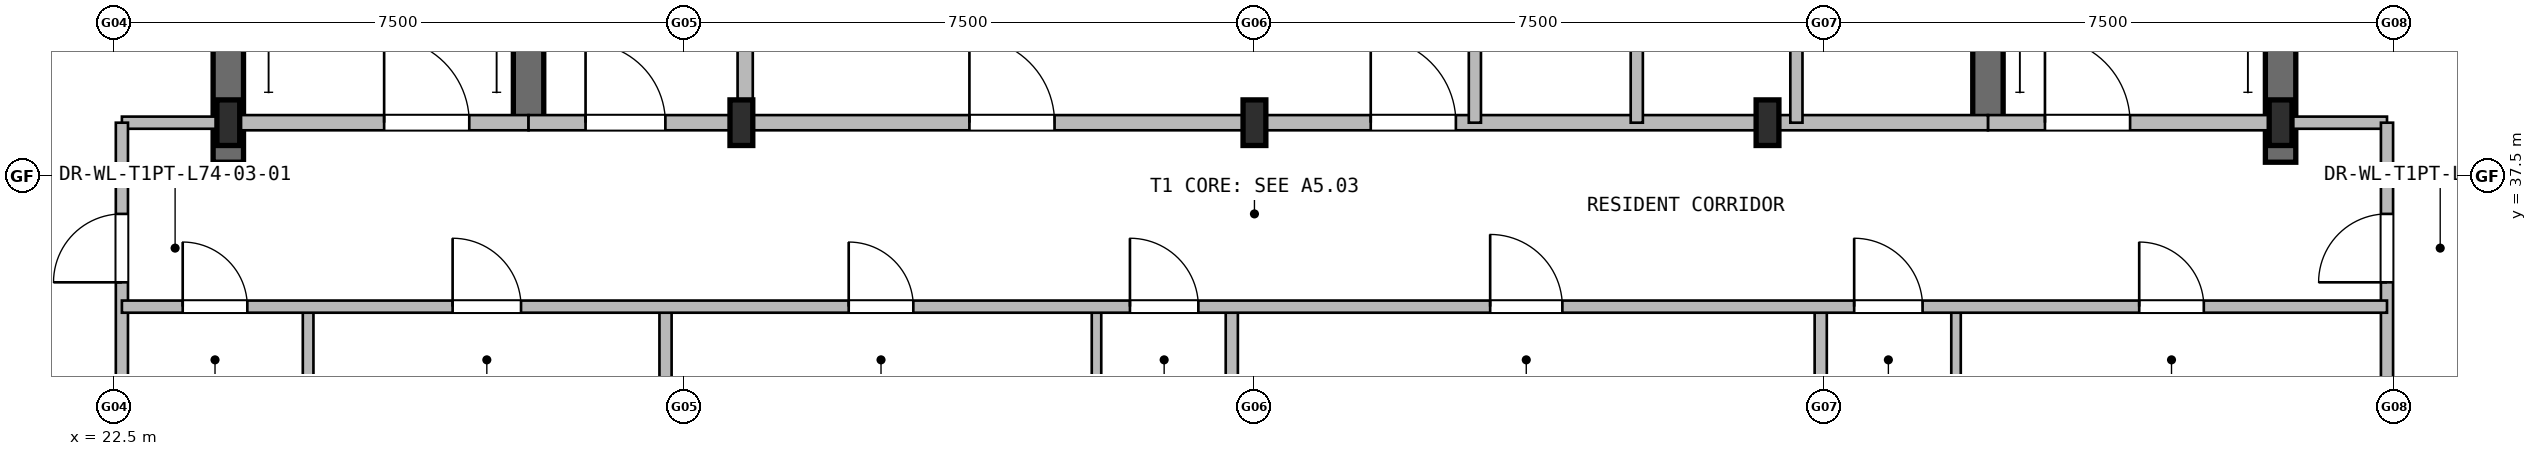
"""IFC4 building model, lengths in metres.
Left out: names, types, materials, properties, quantities, classifications, styles, units other than length and angle.
Written with IfcOpenShell. Run it as: python <this file> out.ifc"""

import sys

from ifc_helpers import new_model, si_unit, direction, frame, frame_2d, origin, origin_2d, place, context, subcontext, project, spatial, rectangle, i_section, extrude, element, fill, save


model = new_model("IFC4")
c1 = context("Model", 3, precision=1e-05, world=origin(), true_north=direction((0.0, 1.0)))
c2 = subcontext(c1, "Body", "Model", "MODEL_VIEW")
j1 = project(units=[si_unit("LENGTHUNIT", "METRE"), si_unit("PLANEANGLEUNIT", "RADIAN")], contexts=[c1])
p1 = place(None, origin())
s1 = spatial("IfcSite", under=j1, at=p1, CompositionType="ELEMENT")
p2 = place(p1, origin())
s2 = spatial("IfcBuilding", under=s1, at=p2, CompositionType="ELEMENT")
p3 = place(p2, frame((0.0, 0.0, 265.8)))
s3 = spatial("IfcBuildingStorey", under=s2, at=p3, CompositionType="ELEMENT", Elevation=265.8)
for number, where, z_axis, x_axis in (
    (1, (24.0, 37.68, 0.0), (0.0, 0.0, 1.0), (0.0, 1.0, 0.0)),
    (2, (51.0, 37.68, 0.0), (0.0, 0.0, 1.0), (0.0, 1.0, 0.0)),
):
    element("IfcWall", number, at=place(p3, frame(where, z_axis=z_axis, x_axis=x_axis)), inside=s3, PredefinedType="SHEAR", context=c2, shape_type="SweptSolid", body=[
        extrude(rectangle(XDim=10.32, YDim=0.4, at=frame_2d((5.16, 0.0))), origin(), (0.0, 0.0, 1.0), 4.2),
    ])
for number, where, z_axis, x_axis in (
    (3, (27.95, 38.2, 0.0), (0.0, 0.0, 1.0), (0.0, 1.0, 0.0)),
    (4, (47.15, 38.2, 0.0), (0.0, 0.0, 1.0), (0.0, 1.0, 0.0)),
):
    element("IfcWall", number, at=place(p3, frame(where, z_axis=z_axis, x_axis=x_axis)), inside=s3, PredefinedType="SHEAR", context=c2, shape_type="SweptSolid", body=[
        extrude(rectangle(XDim=9.8, YDim=0.4, at=frame_2d((4.9, 0.0))), origin(), (0.0, 0.0, 1.0), 4.2),
    ])
for number, where, z_axis, x_axis in (
    (5, (24.0, 38.2, 0.0), (0.0, 0.0, 1.0), (1.0, 0.0, 0.0)),
    (6, (30.75, 38.2, 0.0), (0.0, 0.0, 1.0), (1.0, 0.0, 0.0)),
    (7, (37.5, 38.2, 0.0), (0.0, 0.0, 1.0), (1.0, 0.0, 0.0)),
    (8, (44.25, 38.2, 0.0), (0.0, 0.0, 1.0), (1.0, 0.0, 0.0)),
    (9, (51.0, 38.2, 0.0), (0.0, 0.0, 1.0), (1.0, 0.0, 0.0)),
):
    element("IfcColumn", number, at=place(p3, frame(where, z_axis=z_axis, x_axis=x_axis)), inside=s3, PredefinedType="COLUMN", context=c2, shape_type="SweptSolid", body=[
        extrude(i_section(OverallWidth=0.3, OverallDepth=0.6, WebThickness=0.014, FlangeThickness=0.025, at=origin_2d()), origin(), (0.0, 0.0, 1.0), 4.2),
    ])
p4 = place(p3, frame((24.0, 38.2, 0.0), z_axis=(0.0, 0.0, 1.0), x_axis=(1.0, 0.0, 0.0)))
e10 = element("IfcWall", 10, at=p4, inside=s3, PredefinedType="PARTITIONING", context=c2, shape_type="SweptSolid", body=[
    extrude(rectangle(XDim=3.95, YDim=0.2, at=frame_2d((1.975, 0.0))), origin(), (0.0, 0.0, 1.0), 3.33),
])
p5 = place(p4, frame((2.05, 0.0, 0.0)))
e11 = element("IfcOpeningElement", 11, at=p5, cuts=e10, PredefinedType="OPENING", context=c2, shape_type="SweptSolid", body=[
    extrude(rectangle(XDim=1.12, YDim=2.1, at=frame_2d((0.56, 1.05))), frame((0.0, 0.11, 0.0), z_axis=(0.0, -1.0, 0.0), x_axis=(1.0, 0.0, 0.0)), (0.0, 0.0, 1.0), 0.22),
])
p6 = place(p3, frame((47.15, 38.2, 0.0), z_axis=(0.0, 0.0, 1.0), x_axis=(1.0, 0.0, 0.0)))
e12 = element("IfcWall", 12, at=p6, inside=s3, PredefinedType="PARTITIONING", context=c2, shape_type="SweptSolid", body=[
    extrude(rectangle(XDim=3.85, YDim=0.2, at=frame_2d((1.925, 0.0))), origin(), (0.0, 0.0, 1.0), 3.33),
])
p7 = place(p6, frame((0.75, 0.0, 0.0)))
e13 = element("IfcOpeningElement", 13, at=p7, cuts=e12, PredefinedType="OPENING", context=c2, shape_type="SweptSolid", body=[
    extrude(rectangle(XDim=1.12, YDim=2.1, at=frame_2d((0.56, 1.05))), frame((0.0, 0.11, 0.0), z_axis=(0.0, -1.0, 0.0), x_axis=(1.0, 0.0, 0.0)), (0.0, 0.0, 1.0), 0.22),
])
p8 = place(p3, frame((30.8, 38.2, 0.0), z_axis=(0.0, 0.0, 1.0), x_axis=(0.0, 1.0, 0.0)))
e14 = element("IfcWall", 14, at=p8, inside=s3, PredefinedType="PARTITIONING", context=c2, shape_type="SweptSolid", body=[
    extrude(rectangle(XDim=6.45, YDim=0.2, at=frame_2d((3.225, 0.0))), origin(), (0.0, 0.0, 1.0), 3.33),
])
p9 = place(p8, frame((3.59, 0.0, 0.0)))
e15 = element("IfcOpeningElement", 15, at=p9, cuts=e14, PredefinedType="OPENING", context=c2, shape_type="SweptSolid", body=[
    extrude(rectangle(XDim=1.05, YDim=2.1, at=frame_2d((0.525, 1.05))), frame((0.0, 0.11, 0.0), z_axis=(0.0, -1.0, 0.0), x_axis=(1.0, 0.0, 0.0)), (0.0, 0.0, 1.0), 0.22),
])
p10 = place(p3, frame((27.95, 38.2, 0.0), z_axis=(0.0, 0.0, 1.0), x_axis=(1.0, 0.0, 0.0)))
e16 = element("IfcWall", 16, at=p10, inside=s3, PredefinedType="PARTITIONING", context=c2, shape_type="SweptSolid", body=[
    extrude(rectangle(XDim=2.85, YDim=0.2, at=frame_2d((1.425, 0.0))), origin(), (0.0, 0.0, 1.0), 3.33),
])
p11 = place(p10, frame((0.75, 0.0, 0.0)))
e17 = element("IfcOpeningElement", 17, at=p11, cuts=e16, PredefinedType="OPENING", context=c2, shape_type="SweptSolid", body=[
    extrude(rectangle(XDim=1.05, YDim=2.1, at=frame_2d((0.525, 1.05))), frame((0.0, 0.11, 0.0), z_axis=(0.0, -1.0, 0.0), x_axis=(1.0, 0.0, 0.0)), (0.0, 0.0, 1.0), 0.22),
])
p12 = place(p3, frame((30.8, 38.2, 0.0), z_axis=(0.0, 0.0, 1.0), x_axis=(1.0, 0.0, 0.0)))
e18 = element("IfcWall", 18, at=p12, inside=s3, PredefinedType="PARTITIONING", context=c2, shape_type="SweptSolid", body=[
    extrude(rectangle(XDim=16.35, YDim=0.2, at=frame_2d((8.175, 0.0))), origin(), (0.0, 0.0, 1.0), 3.33),
])
p13 = place(p12, frame((2.95, 0.0, 0.0)))
e19 = element("IfcOpeningElement", 19, at=p13, cuts=e18, PredefinedType="OPENING", context=c2, shape_type="SweptSolid", body=[
    extrude(rectangle(XDim=1.12, YDim=2.1, at=frame_2d((0.56, 1.05))), frame((0.0, 0.11, 0.0), z_axis=(0.0, -1.0, 0.0), x_axis=(1.0, 0.0, 0.0)), (0.0, 0.0, 1.0), 0.22),
])
p14 = place(p12, frame((8.23, 0.0, 0.0)))
e20 = element("IfcOpeningElement", 20, at=p14, cuts=e18, PredefinedType="OPENING", context=c2, shape_type="SweptSolid", body=[
    extrude(rectangle(XDim=1.12, YDim=2.1, at=frame_2d((0.56, 1.05))), frame((0.0, 0.11, 0.0), z_axis=(0.0, -1.0, 0.0), x_axis=(1.0, 0.0, 0.0)), (0.0, 0.0, 1.0), 0.22),
])
for number, where, z_axis, x_axis in (
    (21, (40.4, 38.2, 0.0), (0.0, 0.0, 1.0), (0.0, 1.0, 0.0)),
    (22, (42.53, 38.2, 0.0), (0.0, 0.0, 1.0), (0.0, 1.0, 0.0)),
    (23, (44.63, 38.2, 0.0), (0.0, 0.0, 1.0), (0.0, 1.0, 0.0)),
):
    element("IfcWall", number, at=place(p3, frame(where, z_axis=z_axis, x_axis=x_axis)), inside=s3, PredefinedType="PARTITIONING", context=c2, shape_type="SweptSolid", body=[
        extrude(rectangle(XDim=3.05, YDim=0.16, at=frame_2d((1.525, 0.0))), origin(), (0.0, 0.0, 1.0), 3.93),
    ])
for number, where, z_axis, x_axis in (
    (24, (22.6, 38.2, 0.0), (0.0, 0.0, 1.0), (1.0, 0.0, 0.0)),
    (25, (51.0, 38.2, 0.0), (0.0, 0.0, 1.0), (1.0, 0.0, 0.0)),
):
    element("IfcWall", number, at=place(p3, frame(where, z_axis=z_axis, x_axis=x_axis)), inside=s3, PredefinedType="PARTITIONING", context=c2, shape_type="SweptSolid", body=[
        extrude(rectangle(XDim=1.4, YDim=0.16, at=frame_2d((0.7, 0.0))), origin(), (0.0, 0.0, 1.0), 3.33),
    ])
p15 = place(p3, frame((22.6, 23.6, 0.0), z_axis=(0.0, 0.0, 1.0), x_axis=(0.0, 1.0, 0.0)))
e26 = element("IfcWall", 26, at=p15, inside=s3, PredefinedType="PARTITIONING", context=c2, shape_type="SweptSolid", body=[
    extrude(rectangle(XDim=14.6, YDim=0.16, at=frame_2d((7.3, 0.0))), origin(), (0.0, 0.0, 1.0), 3.93),
])
p16 = place(p15, frame((12.5, 0.0, 0.0)))
e27 = element("IfcOpeningElement", 27, at=p16, cuts=e26, PredefinedType="OPENING", context=c2, shape_type="SweptSolid", body=[
    extrude(rectangle(XDim=0.9, YDim=2.05, at=frame_2d((0.45, 1.025))), frame((0.0, 0.09, 0.0), z_axis=(0.0, -1.0, 0.0), x_axis=(1.0, 0.0, 0.0)), (0.0, 0.0, 1.0), 0.18),
])
p17 = place(p3, frame((52.4, 23.6, 0.0), z_axis=(0.0, 0.0, 1.0), x_axis=(0.0, 1.0, 0.0)))
e28 = element("IfcWall", 28, at=p17, inside=s3, PredefinedType="PARTITIONING", context=c2, shape_type="SweptSolid", body=[
    extrude(rectangle(XDim=14.6, YDim=0.16, at=frame_2d((7.3, 0.0))), origin(), (0.0, 0.0, 1.0), 3.93),
])
p18 = place(p17, frame((12.5, 0.0, 0.0)))
e29 = element("IfcOpeningElement", 29, at=p18, cuts=e28, PredefinedType="OPENING", context=c2, shape_type="SweptSolid", body=[
    extrude(rectangle(XDim=0.9, YDim=2.05, at=frame_2d((0.45, 1.025))), frame((0.0, 0.09, 0.0), z_axis=(0.0, -1.0, 0.0), x_axis=(1.0, 0.0, 0.0)), (0.0, 0.0, 1.0), 0.18),
])
p19 = place(p3, frame((25.05, 32.88, 0.0), z_axis=(0.0, 0.0, 1.0), x_axis=(0.0, 1.0, 0.0)))
e30 = element("IfcWall", 30, at=p19, inside=s3, PredefinedType="PARTITIONING", context=c2, shape_type="SweptSolid", body=[
    extrude(rectangle(XDim=2.9, YDim=0.14, at=frame_2d((1.45, 0.0))), origin(), (0.0, 0.0, 1.0), 3.93),
])
p20 = place(p3, frame((29.752, 23.6, 0.0), z_axis=(0.0, 0.0, 1.0), x_axis=(0.0, 1.0, 0.0)))
e31 = element("IfcWall", 31, at=p20, inside=s3, PredefinedType="PARTITIONING", context=c2, shape_type="SweptSolid", body=[
    extrude(rectangle(XDim=12.18, YDim=0.16, at=frame_2d((6.09, 0.0))), origin(), (0.0, 0.0, 1.0), 3.93),
])
p21 = place(p3, frame((35.422, 32.73, 0.0), z_axis=(0.0, 0.0, 1.0), x_axis=(0.0, 1.0, 0.0)))
e32 = element("IfcWall", 32, at=p21, inside=s3, PredefinedType="PARTITIONING", context=c2, shape_type="SweptSolid", body=[
    extrude(rectangle(XDim=3.05, YDim=0.125, at=frame_2d((1.525, 0.0))), origin(), (0.0, 0.0, 1.0), 3.93),
])
for number, where, z_axis, x_axis in (
    (33, (37.202, 23.6, 0.0), (0.0, 0.0, 1.0), (0.0, 1.0, 0.0)),
    (34, (44.95, 23.6, 0.0), (0.0, 0.0, 1.0), (0.0, 1.0, 0.0)),
):
    element("IfcWall", number, at=place(p3, frame(where, z_axis=z_axis, x_axis=x_axis)), inside=s3, PredefinedType="PARTITIONING", context=c2, shape_type="SweptSolid", body=[
        extrude(rectangle(XDim=12.18, YDim=0.16, at=frame_2d((6.09, 0.0))), origin(), (0.0, 0.0, 1.0), 3.93),
    ])
p22 = place(p3, frame((46.73, 32.73, 0.0), z_axis=(0.0, 0.0, 1.0), x_axis=(0.0, 1.0, 0.0)))
e35 = element("IfcWall", 35, at=p22, inside=s3, PredefinedType="PARTITIONING", context=c2, shape_type="SweptSolid", body=[
    extrude(rectangle(XDim=3.05, YDim=0.125, at=frame_2d((1.525, 0.0))), origin(), (0.0, 0.0, 1.0), 3.93),
])
p23 = place(p3, frame((22.6, 35.78, 0.0), z_axis=(0.0, 0.0, 1.0), x_axis=(1.0, 0.0, 0.0)))
e36 = element("IfcWall", 36, at=p23, inside=s3, PredefinedType="PARTITIONING", context=c2, shape_type="SweptSolid", body=[
    extrude(rectangle(XDim=29.8, YDim=0.16, at=frame_2d((14.9, 0.0))), origin(), (0.0, 0.0, 1.0), 3.93),
])
p24 = place(p23, frame((0.8, 0.0, 0.0)))
e37 = element("IfcOpeningElement", 37, at=p24, cuts=e36, PredefinedType="OPENING", context=c2, shape_type="SweptSolid", body=[
    extrude(rectangle(XDim=0.85, YDim=2.05, at=frame_2d((0.425, 1.025))), frame((0.0, 0.09, 0.0), z_axis=(0.0, -1.0, 0.0), x_axis=(1.0, 0.0, 0.0)), (0.0, 0.0, 1.0), 0.18),
])
p25 = place(p23, frame((4.351, 0.0, 0.0)))
e38 = element("IfcOpeningElement", 38, at=p25, cuts=e36, PredefinedType="OPENING", context=c2, shape_type="SweptSolid", body=[
    extrude(rectangle(XDim=0.9, YDim=2.05, at=frame_2d((0.45, 1.025))), frame((0.0, 0.09, 0.0), z_axis=(0.0, -1.0, 0.0), x_axis=(1.0, 0.0, 0.0)), (0.0, 0.0, 1.0), 0.18),
])
p26 = place(p23, frame((9.562, 0.0, 0.0)))
e39 = element("IfcOpeningElement", 39, at=p26, cuts=e36, PredefinedType="OPENING", context=c2, shape_type="SweptSolid", body=[
    extrude(rectangle(XDim=0.85, YDim=2.05, at=frame_2d((0.425, 1.025))), frame((0.0, 0.09, 0.0), z_axis=(0.0, -1.0, 0.0), x_axis=(1.0, 0.0, 0.0)), (0.0, 0.0, 1.0), 0.18),
])
p27 = place(p23, frame((13.262, 0.0, 0.0)))
e40 = element("IfcOpeningElement", 40, at=p27, cuts=e36, PredefinedType="OPENING", context=c2, shape_type="SweptSolid", body=[
    extrude(rectangle(XDim=0.9, YDim=2.05, at=frame_2d((0.45, 1.025))), frame((0.0, 0.09, 0.0), z_axis=(0.0, -1.0, 0.0), x_axis=(1.0, 0.0, 0.0)), (0.0, 0.0, 1.0), 0.18),
])
p28 = place(p23, frame((18.001, 0.0, 0.0)))
e41 = element("IfcOpeningElement", 41, at=p28, cuts=e36, PredefinedType="OPENING", context=c2, shape_type="SweptSolid", body=[
    extrude(rectangle(XDim=0.95, YDim=2.1, at=frame_2d((0.475, 1.05))), frame((0.0, 0.09, 0.0), z_axis=(0.0, -1.0, 0.0), x_axis=(1.0, 0.0, 0.0)), (0.0, 0.0, 1.0), 0.18),
])
p29 = place(p23, frame((26.54, 0.0, 0.0)))
e42 = element("IfcOpeningElement", 42, at=p29, cuts=e36, PredefinedType="OPENING", context=c2, shape_type="SweptSolid", body=[
    extrude(rectangle(XDim=0.85, YDim=2.05, at=frame_2d((0.425, 1.025))), frame((0.0, 0.09, 0.0), z_axis=(0.0, -1.0, 0.0), x_axis=(1.0, 0.0, 0.0)), (0.0, 0.0, 1.0), 0.18),
])
p30 = place(p23, frame((22.79, 0.0, 0.0)))
e43 = element("IfcOpeningElement", 43, at=p30, cuts=e36, PredefinedType="OPENING", context=c2, shape_type="SweptSolid", body=[
    extrude(rectangle(XDim=0.9, YDim=2.05, at=frame_2d((0.45, 1.025))), frame((0.0, 0.09, 0.0), z_axis=(0.0, -1.0, 0.0), x_axis=(1.0, 0.0, 0.0)), (0.0, 0.0, 1.0), 0.18),
])
p31 = place(p5, origin())
e44 = element("IfcDoor", 44, at=p31, inside=s3, OperationType="SINGLE_SWING_RIGHT", PredefinedType="DOOR", context=c2, shape_type="SweptSolid", body=[
    extrude(rectangle(XDim=1.12, YDim=2.1, at=frame_2d((0.56, 1.05))), frame((0.0, 0.025, 0.0), z_axis=(0.0, -1.0, 0.0), x_axis=(1.0, 0.0, 0.0)), (0.0, 0.0, 1.0), 0.05),
])
fill(e11, e44)
p32 = place(p7, origin())
e45 = element("IfcDoor", 45, at=p32, inside=s3, OperationType="SINGLE_SWING_LEFT", PredefinedType="DOOR", context=c2, shape_type="SweptSolid", body=[
    extrude(rectangle(XDim=1.12, YDim=2.1, at=frame_2d((0.56, 1.05))), frame((0.0, 0.025, 0.0), z_axis=(0.0, -1.0, 0.0), x_axis=(1.0, 0.0, 0.0)), (0.0, 0.0, 1.0), 0.05),
])
fill(e13, e45)
p33 = place(p11, origin())
e46 = element("IfcDoor", 46, at=p33, inside=s3, OperationType="SINGLE_SWING_LEFT", PredefinedType="DOOR", context=c2, shape_type="SweptSolid", body=[
    extrude(rectangle(XDim=1.05, YDim=2.1, at=frame_2d((0.525, 1.05))), frame((0.0, 0.025, 0.0), z_axis=(0.0, -1.0, 0.0), x_axis=(1.0, 0.0, 0.0)), (0.0, 0.0, 1.0), 0.05),
])
fill(e17, e46)
p34 = place(p13, origin())
e47 = element("IfcDoor", 47, at=p34, inside=s3, OperationType="SINGLE_SWING_RIGHT", PredefinedType="DOOR", context=c2, shape_type="SweptSolid", body=[
    extrude(rectangle(XDim=1.12, YDim=2.1, at=frame_2d((0.56, 1.05))), frame((0.0, 0.025, 0.0), z_axis=(0.0, -1.0, 0.0), x_axis=(1.0, 0.0, 0.0)), (0.0, 0.0, 1.0), 0.05),
])
fill(e19, e47)
p35 = place(p14, origin())
e48 = element("IfcDoor", 48, at=p35, inside=s3, OperationType="SINGLE_SWING_LEFT", PredefinedType="DOOR", context=c2, shape_type="SweptSolid", body=[
    extrude(rectangle(XDim=1.12, YDim=2.1, at=frame_2d((0.56, 1.05))), frame((0.0, 0.025, 0.0), z_axis=(0.0, -1.0, 0.0), x_axis=(1.0, 0.0, 0.0)), (0.0, 0.0, 1.0), 0.05),
])
fill(e20, e48)
p36 = place(p16, origin())
e49 = element("IfcDoor", 49, at=p36, inside=s3, OperationType="SINGLE_SWING_RIGHT", PredefinedType="DOOR", context=c2, shape_type="SweptSolid", body=[
    extrude(rectangle(XDim=0.9, YDim=2.05, at=frame_2d((0.45, 1.025))), frame((0.0, 0.025, 0.0), z_axis=(0.0, -1.0, 0.0), x_axis=(1.0, 0.0, 0.0)), (0.0, 0.0, 1.0), 0.05),
])
fill(e27, e49)
p37 = place(p18, origin())
e50 = element("IfcDoor", 50, at=p37, inside=s3, OperationType="SINGLE_SWING_LEFT", PredefinedType="DOOR", context=c2, shape_type="SweptSolid", body=[
    extrude(rectangle(XDim=0.9, YDim=2.05, at=frame_2d((0.45, 1.025))), frame((0.0, 0.025, 0.0), z_axis=(0.0, -1.0, 0.0), x_axis=(1.0, 0.0, 0.0)), (0.0, 0.0, 1.0), 0.05),
])
fill(e29, e50)
p38 = place(p24, origin())
e51 = element("IfcDoor", 51, at=p38, inside=s3, OperationType="SINGLE_SWING_RIGHT", PredefinedType="DOOR", context=c2, shape_type="SweptSolid", body=[
    extrude(rectangle(XDim=0.85, YDim=2.05, at=frame_2d((0.425, 1.025))), frame((0.0, 0.025, 0.0), z_axis=(0.0, -1.0, 0.0), x_axis=(1.0, 0.0, 0.0)), (0.0, 0.0, 1.0), 0.05),
])
fill(e37, e51)
p39 = place(p25, origin())
e52 = element("IfcDoor", 52, at=p39, inside=s3, OperationType="SINGLE_SWING_LEFT", PredefinedType="DOOR", context=c2, shape_type="SweptSolid", body=[
    extrude(rectangle(XDim=0.9, YDim=2.05, at=frame_2d((0.45, 1.025))), frame((0.0, 0.025, 0.0), z_axis=(0.0, -1.0, 0.0), x_axis=(1.0, 0.0, 0.0)), (0.0, 0.0, 1.0), 0.05),
])
fill(e38, e52)
p40 = place(p26, origin())
e53 = element("IfcDoor", 53, at=p40, inside=s3, OperationType="SINGLE_SWING_RIGHT", PredefinedType="DOOR", context=c2, shape_type="SweptSolid", body=[
    extrude(rectangle(XDim=0.85, YDim=2.05, at=frame_2d((0.425, 1.025))), frame((0.0, 0.025, 0.0), z_axis=(0.0, -1.0, 0.0), x_axis=(1.0, 0.0, 0.0)), (0.0, 0.0, 1.0), 0.05),
])
fill(e39, e53)
p41 = place(p27, origin())
e54 = element("IfcDoor", 54, at=p41, inside=s3, OperationType="SINGLE_SWING_LEFT", PredefinedType="DOOR", context=c2, shape_type="SweptSolid", body=[
    extrude(rectangle(XDim=0.9, YDim=2.05, at=frame_2d((0.45, 1.025))), frame((0.0, 0.025, 0.0), z_axis=(0.0, -1.0, 0.0), x_axis=(1.0, 0.0, 0.0)), (0.0, 0.0, 1.0), 0.05),
])
fill(e40, e54)
p42 = place(p28, origin())
e55 = element("IfcDoor", 55, at=p42, inside=s3, OperationType="SINGLE_SWING_RIGHT", PredefinedType="DOOR", context=c2, shape_type="SweptSolid", body=[
    extrude(rectangle(XDim=0.95, YDim=2.1, at=frame_2d((0.475, 1.05))), frame((0.0, 0.025, 0.0), z_axis=(0.0, -1.0, 0.0), x_axis=(1.0, 0.0, 0.0)), (0.0, 0.0, 1.0), 0.05),
])
fill(e41, e55)
p43 = place(p29, origin())
e56 = element("IfcDoor", 56, at=p43, inside=s3, OperationType="SINGLE_SWING_LEFT", PredefinedType="DOOR", context=c2, shape_type="SweptSolid", body=[
    extrude(rectangle(XDim=0.85, YDim=2.05, at=frame_2d((0.425, 1.025))), frame((0.0, 0.025, 0.0), z_axis=(0.0, -1.0, 0.0), x_axis=(1.0, 0.0, 0.0)), (0.0, 0.0, 1.0), 0.05),
])
fill(e42, e56)
p44 = place(p30, origin())
e57 = element("IfcDoor", 57, at=p44, inside=s3, OperationType="SINGLE_SWING_RIGHT", PredefinedType="DOOR", context=c2, shape_type="SweptSolid", body=[
    extrude(rectangle(XDim=0.9, YDim=2.05, at=frame_2d((0.45, 1.025))), frame((0.0, 0.025, 0.0), z_axis=(0.0, -1.0, 0.0), x_axis=(1.0, 0.0, 0.0)), (0.0, 0.0, 1.0), 0.05),
])
fill(e43, e57)
save(model, sys.argv[1])
